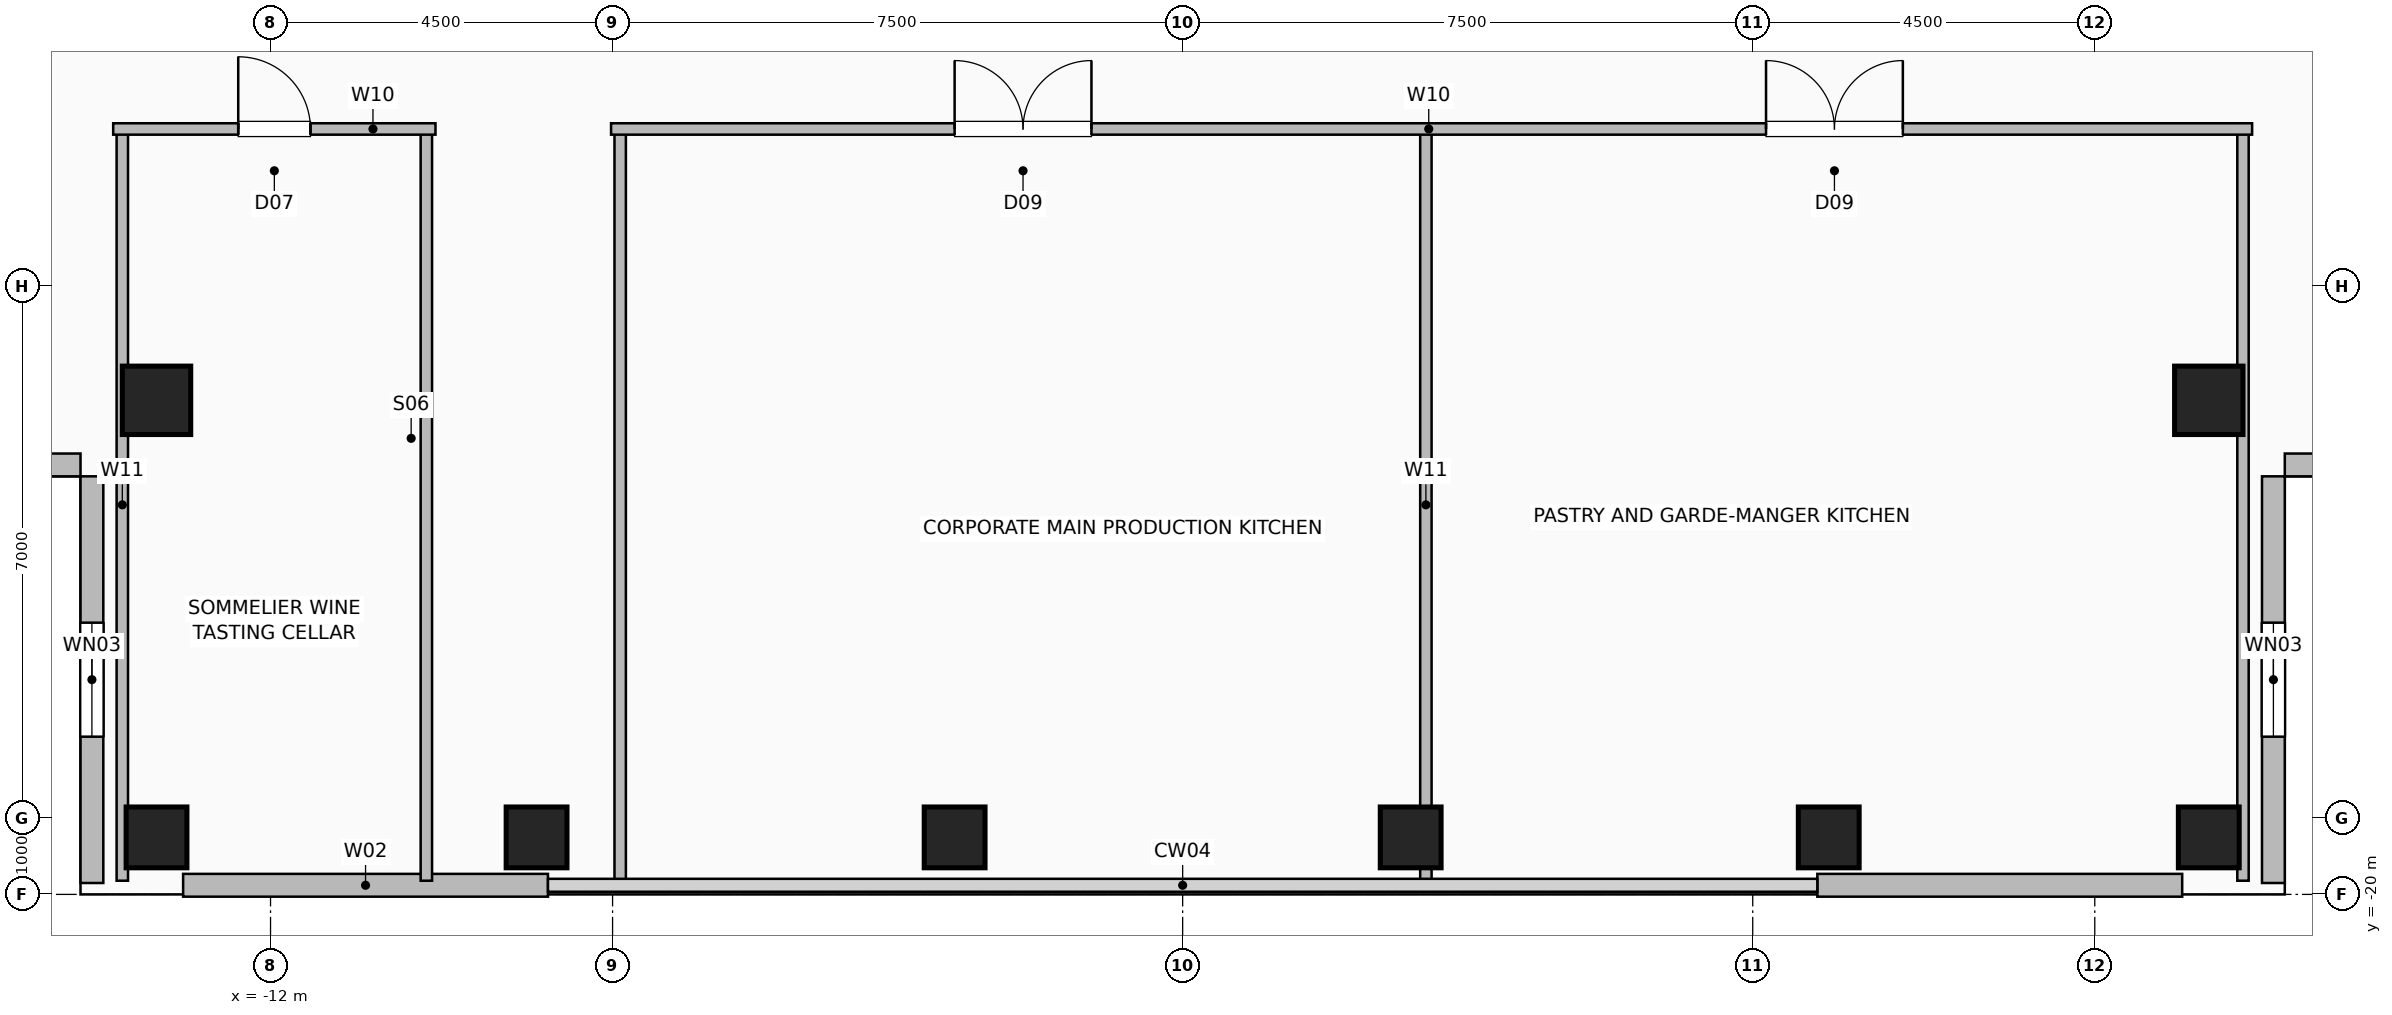
"""IFC4 building model, lengths in metres.
Left out: names, types, materials, properties, quantities, classifications, styles, units other than length and angle.
Written with IfcOpenShell. Run it as: python <this file> out.ifc"""

import sys

from ifc_helpers import new_model, si_unit, direction, frame, frame_2d, origin, origin_2d, place, context, subcontext, project, spatial, rectangle, hollow_rectangle, extrude, element, fill, save


model = new_model("IFC4")
c1 = context("Model", 3, precision=1e-05, world=origin(), true_north=direction((0.0, 1.0)))
c2 = subcontext(c1, "Body", "Model", "MODEL_VIEW")
j1 = project(units=[si_unit("LENGTHUNIT", "METRE"), si_unit("PLANEANGLEUNIT", "RADIAN")], contexts=[c1])
p1 = place(None, origin())
s1 = spatial("IfcSite", under=j1, at=p1, CompositionType="ELEMENT")
p2 = place(p1, origin())
s2 = spatial("IfcBuilding", under=s1, at=p2, CompositionType="ELEMENT")
p3 = place(p2, frame((0.0, 0.0, 191.4)))
s3 = spatial("IfcBuildingStorey", under=s2, at=p3, CompositionType="ELEMENT", Elevation=191.4)
for number, where, z_axis, x_axis in (
    (1, (-13.5, -19.25, 0.0), (0.0, 0.0, 1.0), (1.0, 0.0, 0.0)),
    (2, (-8.5, -19.25, 0.0), (0.0, 0.0, 1.0), (1.0, 0.0, 0.0)),
    (3, (-3.0, -19.25, 0.0), (0.0, 0.0, 1.0), (1.0, 0.0, 0.0)),
    (4, (3.0, -19.25, 0.0), (0.0, 0.0, 1.0), (1.0, 0.0, 0.0)),
    (5, (8.5, -19.25, 0.0), (0.0, 0.0, 1.0), (1.0, 0.0, 0.0)),
    (6, (13.5, -19.25, 0.0), (0.0, 0.0, 1.0), (1.0, 0.0, 0.0)),
):
    element("IfcColumn", number, at=place(p3, frame(where, z_axis=z_axis, x_axis=x_axis)), inside=s3, PredefinedType="COLUMN", context=c2, shape_type="SweptSolid", body=[
        extrude(hollow_rectangle(XDim=0.8, YDim=0.8, WallThickness=0.04, at=origin_2d()), origin(), (0.0, 0.0, 1.0), 3.6),
    ])
for number, where, z_axis, x_axis in (
    (7, (-13.5, -13.5, 0.0), (0.0, 0.0, 1.0), (1.0, 0.0, 0.0)),
    (8, (13.5, -13.5, 0.0), (0.0, 0.0, 1.0), (1.0, 0.0, 0.0)),
):
    element("IfcColumn", number, at=place(p3, frame(where, z_axis=z_axis, x_axis=x_axis)), inside=s3, PredefinedType="COLUMN", context=c2, shape_type="SweptSolid", body=[
        extrude(hollow_rectangle(XDim=0.9, YDim=0.9, WallThickness=0.045, at=origin_2d()), origin(), (0.0, 0.0, 1.0), 3.6),
    ])
for number, where, z_axis, x_axis in (
    (9, (-13.15, -19.88, 0.0), (0.0, 0.0, 1.0), (1.0, 0.0, 0.0)),
    (10, (8.35, -19.88, 0.0), (0.0, 0.0, 1.0), (1.0, 0.0, 0.0)),
):
    element("IfcWall", number, at=place(p3, frame(where, z_axis=z_axis, x_axis=x_axis)), inside=s3, PredefinedType="SOLIDWALL", context=c2, shape_type="SweptSolid", body=[
        extrude(rectangle(XDim=4.8, YDim=0.3, at=frame_2d((2.4, 0.0))), origin(), (0.0, 0.0, 1.0), 3.36),
    ])
p4 = place(p3, frame((-14.35, -19.85, 0.0), z_axis=(0.0, 0.0, 1.0), x_axis=(0.0, 1.0, 0.0)))
e11 = element("IfcWall", 11, at=p4, inside=s3, PredefinedType="SOLIDWALL", context=c2, shape_type="SweptSolid", body=[
    extrude(rectangle(XDim=5.35, YDim=0.3, at=frame_2d((2.675, 0.0))), origin(), (0.0, 0.0, 1.0), 3.36),
])
p5 = place(p4, frame((1.925, 0.0, 0.9)))
e12 = element("IfcOpeningElement", 12, at=p5, cuts=e11, PredefinedType="OPENING", context=c2, shape_type="SweptSolid", body=[
    extrude(rectangle(XDim=1.5, YDim=1.8, at=frame_2d((0.75, 0.9))), frame((0.0, 0.16, 0.0), z_axis=(0.0, -1.0, 0.0), x_axis=(1.0, 0.0, 0.0)), (0.0, 0.0, 1.0), 0.32),
])
p6 = place(p3, frame((-19.85, -14.35, 0.0), z_axis=(0.0, 0.0, 1.0), x_axis=(1.0, 0.0, 0.0)))
e13 = element("IfcWall", 13, at=p6, inside=s3, PredefinedType="SOLIDWALL", context=c2, shape_type="SweptSolid", body=[
    extrude(rectangle(XDim=5.35, YDim=0.3, at=frame_2d((2.675, 0.0))), origin(), (0.0, 0.0, 1.0), 3.36),
])
p7 = place(p3, frame((14.35, -19.85, 0.0), z_axis=(0.0, 0.0, 1.0), x_axis=(0.0, 1.0, 0.0)))
e14 = element("IfcWall", 14, at=p7, inside=s3, PredefinedType="SOLIDWALL", context=c2, shape_type="SweptSolid", body=[
    extrude(rectangle(XDim=5.35, YDim=0.3, at=frame_2d((2.675, 0.0))), origin(), (0.0, 0.0, 1.0), 3.36),
])
p8 = place(p7, frame((1.925, 0.0, 0.9)))
e15 = element("IfcOpeningElement", 15, at=p8, cuts=e14, PredefinedType="OPENING", context=c2, shape_type="SweptSolid", body=[
    extrude(rectangle(XDim=1.5, YDim=1.8, at=frame_2d((0.75, 0.9))), frame((0.0, 0.16, 0.0), z_axis=(0.0, -1.0, 0.0), x_axis=(1.0, 0.0, 0.0)), (0.0, 0.0, 1.0), 0.32),
])
p9 = place(p3, frame((19.85, -14.35, 0.0), z_axis=(0.0, 0.0, 1.0), x_axis=(-1.0, 0.0, 0.0)))
e16 = element("IfcWall", 16, at=p9, inside=s3, PredefinedType="SOLIDWALL", context=c2, shape_type="SweptSolid", body=[
    extrude(rectangle(XDim=5.35, YDim=0.3, at=frame_2d((2.675, 0.0))), origin(), (0.0, 0.0, 1.0), 3.36),
])
for number, where, z_axis, x_axis in (
    (17, (-13.95, -19.82, 0.0), (0.0, 0.0, 1.0), (0.0, 1.0, 0.0)),
    (18, (-9.95, -19.82, 0.0), (0.0, 0.0, 1.0), (0.0, 1.0, 0.0)),
):
    element("IfcWall", number, at=place(p3, frame(where, z_axis=z_axis, x_axis=x_axis)), inside=s3, PredefinedType="PARTITIONING", context=c2, shape_type="SweptSolid", body=[
        extrude(rectangle(XDim=9.89, YDim=0.15, at=frame_2d((4.945, 0.0))), origin(), (0.0, 0.0, 1.0), 3.36),
    ])
p10 = place(p3, frame((-14.07, -9.93, 0.0), z_axis=(0.0, 0.0, 1.0), x_axis=(1.0, 0.0, 0.0)))
e19 = element("IfcWall", 19, at=p10, inside=s3, PredefinedType="PARTITIONING", context=c2, shape_type="SweptSolid", body=[
    extrude(rectangle(XDim=4.24, YDim=0.15, at=frame_2d((2.12, 0.0))), origin(), (0.0, 0.0, 1.0), 3.36),
])
p11 = place(p10, frame((1.645, 0.0, 0.0)))
e20 = element("IfcOpeningElement", 20, at=p11, cuts=e19, PredefinedType="OPENING", context=c2, shape_type="SweptSolid", body=[
    extrude(rectangle(XDim=0.95, YDim=2.06, at=frame_2d((0.475, 1.03))), frame((0.0, 0.085, 0.0), z_axis=(0.0, -1.0, 0.0), x_axis=(1.0, 0.0, 0.0)), (0.0, 0.0, 1.0), 0.17),
])
for number, where, z_axis, x_axis in (
    (21, (-7.4, -19.82, 0.0), (0.0, 0.0, 1.0), (0.0, 1.0, 0.0)),
    (22, (3.2, -19.82, 0.0), (0.0, 0.0, 1.0), (0.0, 1.0, 0.0)),
    (23, (13.95, -19.82, 0.0), (0.0, 0.0, 1.0), (0.0, 1.0, 0.0)),
):
    element("IfcWall", number, at=place(p3, frame(where, z_axis=z_axis, x_axis=x_axis)), inside=s3, PredefinedType="PARTITIONING", context=c2, shape_type="SweptSolid", body=[
        extrude(rectangle(XDim=9.89, YDim=0.15, at=frame_2d((4.945, 0.0))), origin(), (0.0, 0.0, 1.0), 3.36),
    ])
p12 = place(p3, frame((-7.52, -9.93, 0.0), z_axis=(0.0, 0.0, 1.0), x_axis=(1.0, 0.0, 0.0)))
e24 = element("IfcWall", 24, at=p12, inside=s3, PredefinedType="PARTITIONING", context=c2, shape_type="SweptSolid", body=[
    extrude(rectangle(XDim=21.59, YDim=0.15, at=frame_2d((10.795, 0.0))), origin(), (0.0, 0.0, 1.0), 3.36),
])
p13 = place(p12, frame((4.52, 0.0, 0.0)))
e25 = element("IfcOpeningElement", 25, at=p13, cuts=e24, PredefinedType="OPENING", context=c2, shape_type="SweptSolid", body=[
    extrude(rectangle(XDim=1.8, YDim=2.08, at=frame_2d((0.9, 1.04))), frame((0.0, 0.085, 0.0), z_axis=(0.0, -1.0, 0.0), x_axis=(1.0, 0.0, 0.0)), (0.0, 0.0, 1.0), 0.17),
])
p14 = place(p12, frame((15.195, 0.0, 0.0)))
e26 = element("IfcOpeningElement", 26, at=p14, cuts=e24, PredefinedType="OPENING", context=c2, shape_type="SweptSolid", body=[
    extrude(rectangle(XDim=1.8, YDim=2.08, at=frame_2d((0.9, 1.04))), frame((0.0, 0.085, 0.0), z_axis=(0.0, -1.0, 0.0), x_axis=(1.0, 0.0, 0.0)), (0.0, 0.0, 1.0), 0.17),
])
p15 = place(p5, origin())
e27 = element("IfcWindow", 27, at=p15, inside=s3, PartitioningType="SINGLE_PANEL", PredefinedType="WINDOW", context=c2, shape_type="SweptSolid", body=[
    extrude(rectangle(XDim=1.5, YDim=1.8, at=frame_2d((0.75, 0.9))), frame((0.0, 0.03, 0.0), z_axis=(0.0, -1.0, 0.0), x_axis=(1.0, 0.0, 0.0)), (0.0, 0.0, 1.0), 0.06),
])
fill(e12, e27)
p16 = place(p8, origin())
e28 = element("IfcWindow", 28, at=p16, inside=s3, PartitioningType="SINGLE_PANEL", PredefinedType="WINDOW", context=c2, shape_type="SweptSolid", body=[
    extrude(rectangle(XDim=1.5, YDim=1.8, at=frame_2d((0.75, 0.9))), frame((0.0, 0.03, 0.0), z_axis=(0.0, -1.0, 0.0), x_axis=(1.0, 0.0, 0.0)), (0.0, 0.0, 1.0), 0.06),
])
fill(e15, e28)
p17 = place(p11, origin())
e29 = element("IfcDoor", 29, at=p17, inside=s3, OperationType="SINGLE_SWING_LEFT", PredefinedType="DOOR", context=c2, shape_type="SweptSolid", body=[
    extrude(rectangle(XDim=0.95, YDim=2.06, at=frame_2d((0.475, 1.03))), frame((0.0, 0.025, 0.0), z_axis=(0.0, -1.0, 0.0), x_axis=(1.0, 0.0, 0.0)), (0.0, 0.0, 1.0), 0.05),
])
fill(e20, e29)
p18 = place(p13, origin())
e30 = element("IfcDoor", 30, at=p18, inside=s3, OperationType="DOUBLE_DOOR_SINGLE_SWING", PredefinedType="DOOR", context=c2, shape_type="SweptSolid", body=[
    extrude(rectangle(XDim=1.8, YDim=2.08, at=frame_2d((0.9, 1.04))), frame((0.0, 0.025, 0.0), z_axis=(0.0, -1.0, 0.0), x_axis=(1.0, 0.0, 0.0)), (0.0, 0.0, 1.0), 0.05),
])
fill(e25, e30)
p19 = place(p14, origin())
e31 = element("IfcDoor", 31, at=p19, inside=s3, OperationType="DOUBLE_DOOR_SINGLE_SWING", PredefinedType="DOOR", context=c2, shape_type="SweptSolid", body=[
    extrude(rectangle(XDim=1.8, YDim=2.08, at=frame_2d((0.9, 1.04))), frame((0.0, 0.025, 0.0), z_axis=(0.0, -1.0, 0.0), x_axis=(1.0, 0.0, 0.0)), (0.0, 0.0, 1.0), 0.05),
])
fill(e26, e31)
save(model, sys.argv[1])
